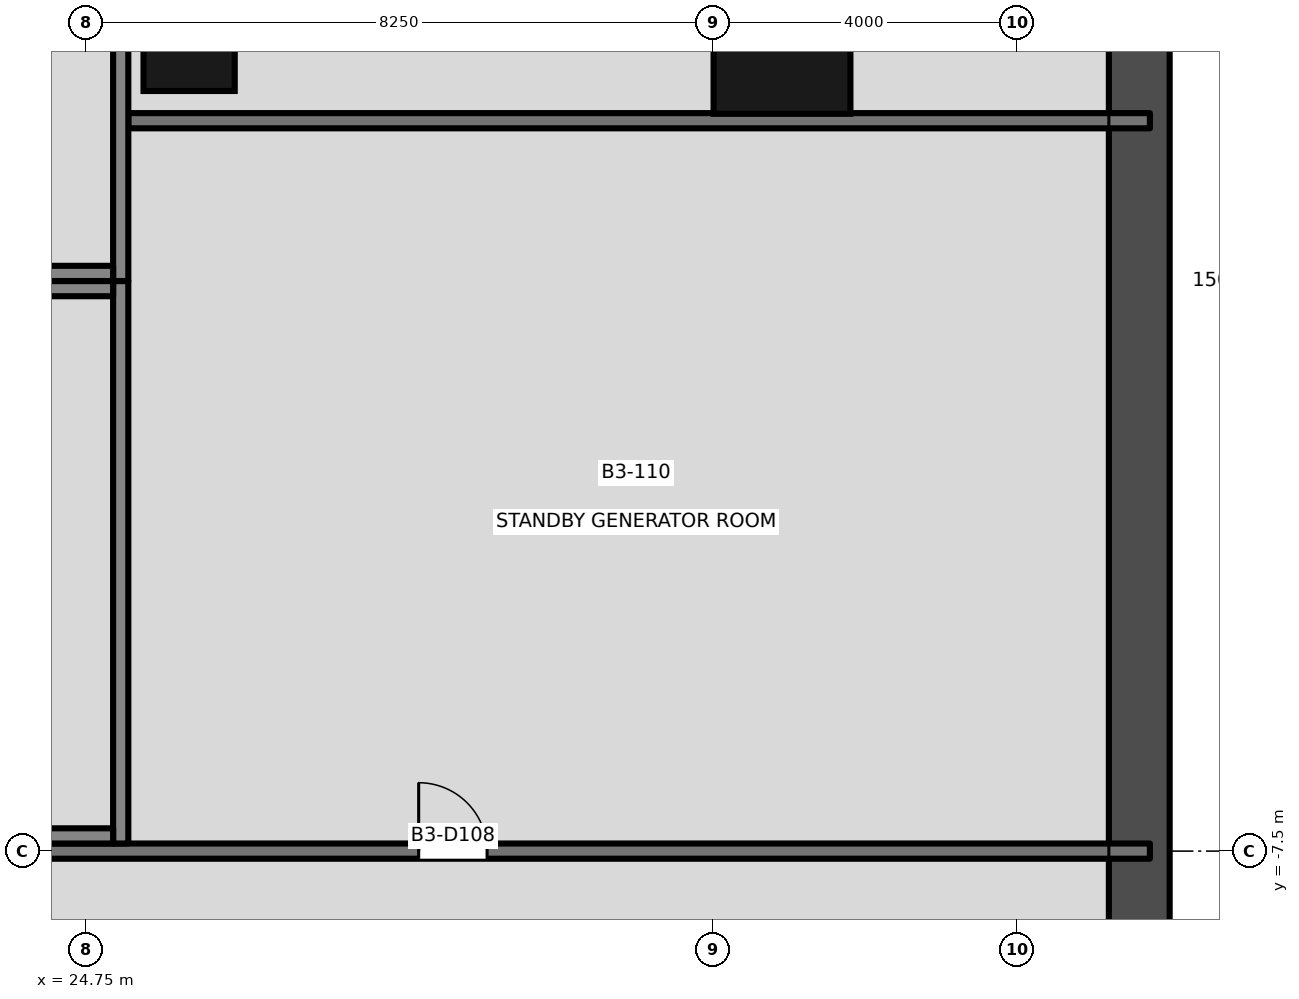
"""IFC4 building model, lengths in metres.
Left out: names, types, materials, properties, quantities, classifications, styles, units other than length and angle.
Written with IfcOpenShell. Run it as: python <this file> out.ifc"""

import sys

from ifc_helpers import new_model, si_unit, direction, frame, frame_2d, origin, origin_2d, place, context, subcontext, project, spatial, rectangle, extrude, element, fill, save


model = new_model("IFC4")
c1 = context("Model", 3, precision=1e-05, world=origin(), true_north=direction((0.0, 1.0)))
c2 = subcontext(c1, "Body", "Model", "MODEL_VIEW")
j1 = project(units=[si_unit("LENGTHUNIT", "METRE"), si_unit("PLANEANGLEUNIT", "RADIAN")], contexts=[c1])
p1 = place(None, origin())
s1 = spatial("IfcSite", under=j1, at=p1, CompositionType="ELEMENT")
p2 = place(p1, origin())
s2 = spatial("IfcBuilding", under=s1, at=p2, CompositionType="ELEMENT")
p3 = place(p2, frame((0.0, 0.0, -13.5)))
s3 = spatial("IfcBuildingStorey", under=s2, at=p3, CompositionType="ELEMENT", Elevation=-13.5)
p4 = place(p3, frame((38.6, -38.7, -0.25), z_axis=(0.0, 0.0, 1.0), x_axis=(0.0, 1.0, 0.0)))
e1 = element("IfcWall", 1, at=p4, inside=s3, PredefinedType="SOLIDWALL", context=c2, shape_type="SweptSolid", body=[
    extrude(rectangle(XDim=51.9, YDim=0.8, at=frame_2d((25.95, 0.0))), origin(), (0.0, 0.0, 1.0), 4.05),
])
p5 = place(p3, frame((33.9, 3.1, -0.25), z_axis=(0.0, 0.0, 1.0), x_axis=(0.0, 1.0, 0.0)))
e2 = element("IfcColumn", 2, at=p5, inside=s3, PredefinedType="COLUMN", context=c2, shape_type="SweptSolid", body=[
    extrude(rectangle(XDim=1.8, YDim=1.8, at=origin_2d()), origin(), (0.0, 0.0, 1.0), 4.05),
])
p6 = place(p3, frame((26.1, 3.1, -0.25), z_axis=(0.0, 0.0, 1.0), x_axis=(1.0, 0.0, 0.0)))
e3 = element("IfcColumn", 3, at=p6, inside=s3, PredefinedType="COLUMN", context=c2, shape_type="SweptSolid", body=[
    extrude(rectangle(XDim=1.2, YDim=1.2, at=origin_2d()), origin(), (0.0, 0.0, 1.0), 4.05),
])
p7 = place(p3, frame((25.2, -7.4, -0.25), z_axis=(0.0, 0.0, 1.0), x_axis=(0.0, 1.0, 0.0)))
e4 = element("IfcWall", 4, at=p7, inside=s3, PredefinedType="SHEAR", context=c2, shape_type="SweptSolid", body=[
    extrude(rectangle(XDim=7.4, YDim=0.2, at=frame_2d((3.7, 0.0))), origin(), (0.0, 0.0, 1.0), 4.05),
])
for number, where, z_axis, x_axis in (
    (5, (20.6, -0.1, -0.25), (0.0, 0.0, 1.0), (1.0, 0.0, 0.0)),
    (6, (20.6, -7.3, -0.25), (0.0, 0.0, 1.0), (1.0, 0.0, 0.0)),
):
    element("IfcWall", number, at=place(p3, frame(where, z_axis=z_axis, x_axis=x_axis)), inside=s3, PredefinedType="SHEAR", context=c2, shape_type="SweptSolid", body=[
        extrude(rectangle(XDim=4.5, YDim=0.2, at=frame_2d((2.25, 0.0))), origin(), (0.0, 0.0, 1.0), 4.05),
    ])
p8 = place(p3, frame((25.2, 0.0, -0.25), z_axis=(0.0, 0.0, 1.0), x_axis=(0.0, 1.0, 0.0)))
e7 = element("IfcWall", 7, at=p8, inside=s3, PredefinedType="SHEAR", context=c2, shape_type="SweptSolid", body=[
    extrude(rectangle(XDim=7.4, YDim=0.2, at=frame_2d((3.7, 0.0))), origin(), (0.0, 0.0, 1.0), 4.05),
])
p9 = place(p3, frame((20.6, 0.1, -0.25), z_axis=(0.0, 0.0, 1.0), x_axis=(1.0, 0.0, 0.0)))
e8 = element("IfcWall", 8, at=p9, inside=s3, PredefinedType="SHEAR", context=c2, shape_type="SweptSolid", body=[
    extrude(rectangle(XDim=4.5, YDim=0.2, at=frame_2d((2.25, 0.0))), origin(), (0.0, 0.0, 1.0), 4.05),
])
p10 = place(p3, frame((20.4, -7.5, 0.0), z_axis=(0.0, 0.0, 1.0), x_axis=(1.0, 0.0, 0.0)))
e9 = element("IfcWall", 9, at=p10, inside=s3, PredefinedType="PARTITIONING", context=c2, shape_type="SweptSolid", body=[
    extrude(rectangle(XDim=18.34, YDim=0.2, at=frame_2d((9.17, 0.0))), origin(), (0.0, 0.0, 1.0), 2.6),
])
p11 = place(p10, frame((8.72, 0.0, 0.0)))
e10 = element("IfcOpeningElement", 10, at=p11, cuts=e9, PredefinedType="OPENING", context=c2, shape_type="SweptSolid", body=[
    extrude(rectangle(XDim=0.9, YDim=2.1, at=frame_2d((0.45, 1.05))), frame((0.0, 0.111, 0.0), z_axis=(0.0, -1.0, 0.0), x_axis=(1.0, 0.0, 0.0)), (0.0, 0.0, 1.0), 0.221),
])
p12 = place(p3, frame((25.3, 2.109, 0.0), z_axis=(0.0, 0.0, 1.0), x_axis=(1.0, 0.0, 0.0)))
e11 = element("IfcWall", 11, at=p12, inside=s3, PredefinedType="PARTITIONING", context=c2, shape_type="SweptSolid", body=[
    extrude(rectangle(XDim=13.44, YDim=0.2, at=frame_2d((6.72, 0.0))), origin(), (0.0, 0.0, 1.0), 2.6),
])
p13 = place(p11, origin())
e12 = element("IfcDoor", 12, at=p13, inside=s3, OperationType="SINGLE_SWING_LEFT", PredefinedType="DOOR", context=c2, shape_type="SweptSolid", body=[
    extrude(rectangle(XDim=0.9, YDim=2.1, at=frame_2d((0.45, 1.05))), frame((0.0, 0.025, 0.0), z_axis=(0.0, -1.0, 0.0), x_axis=(1.0, 0.0, 0.0)), (0.0, 0.0, 1.0), 0.05),
])
fill(e10, e12)
save(model, sys.argv[1])
